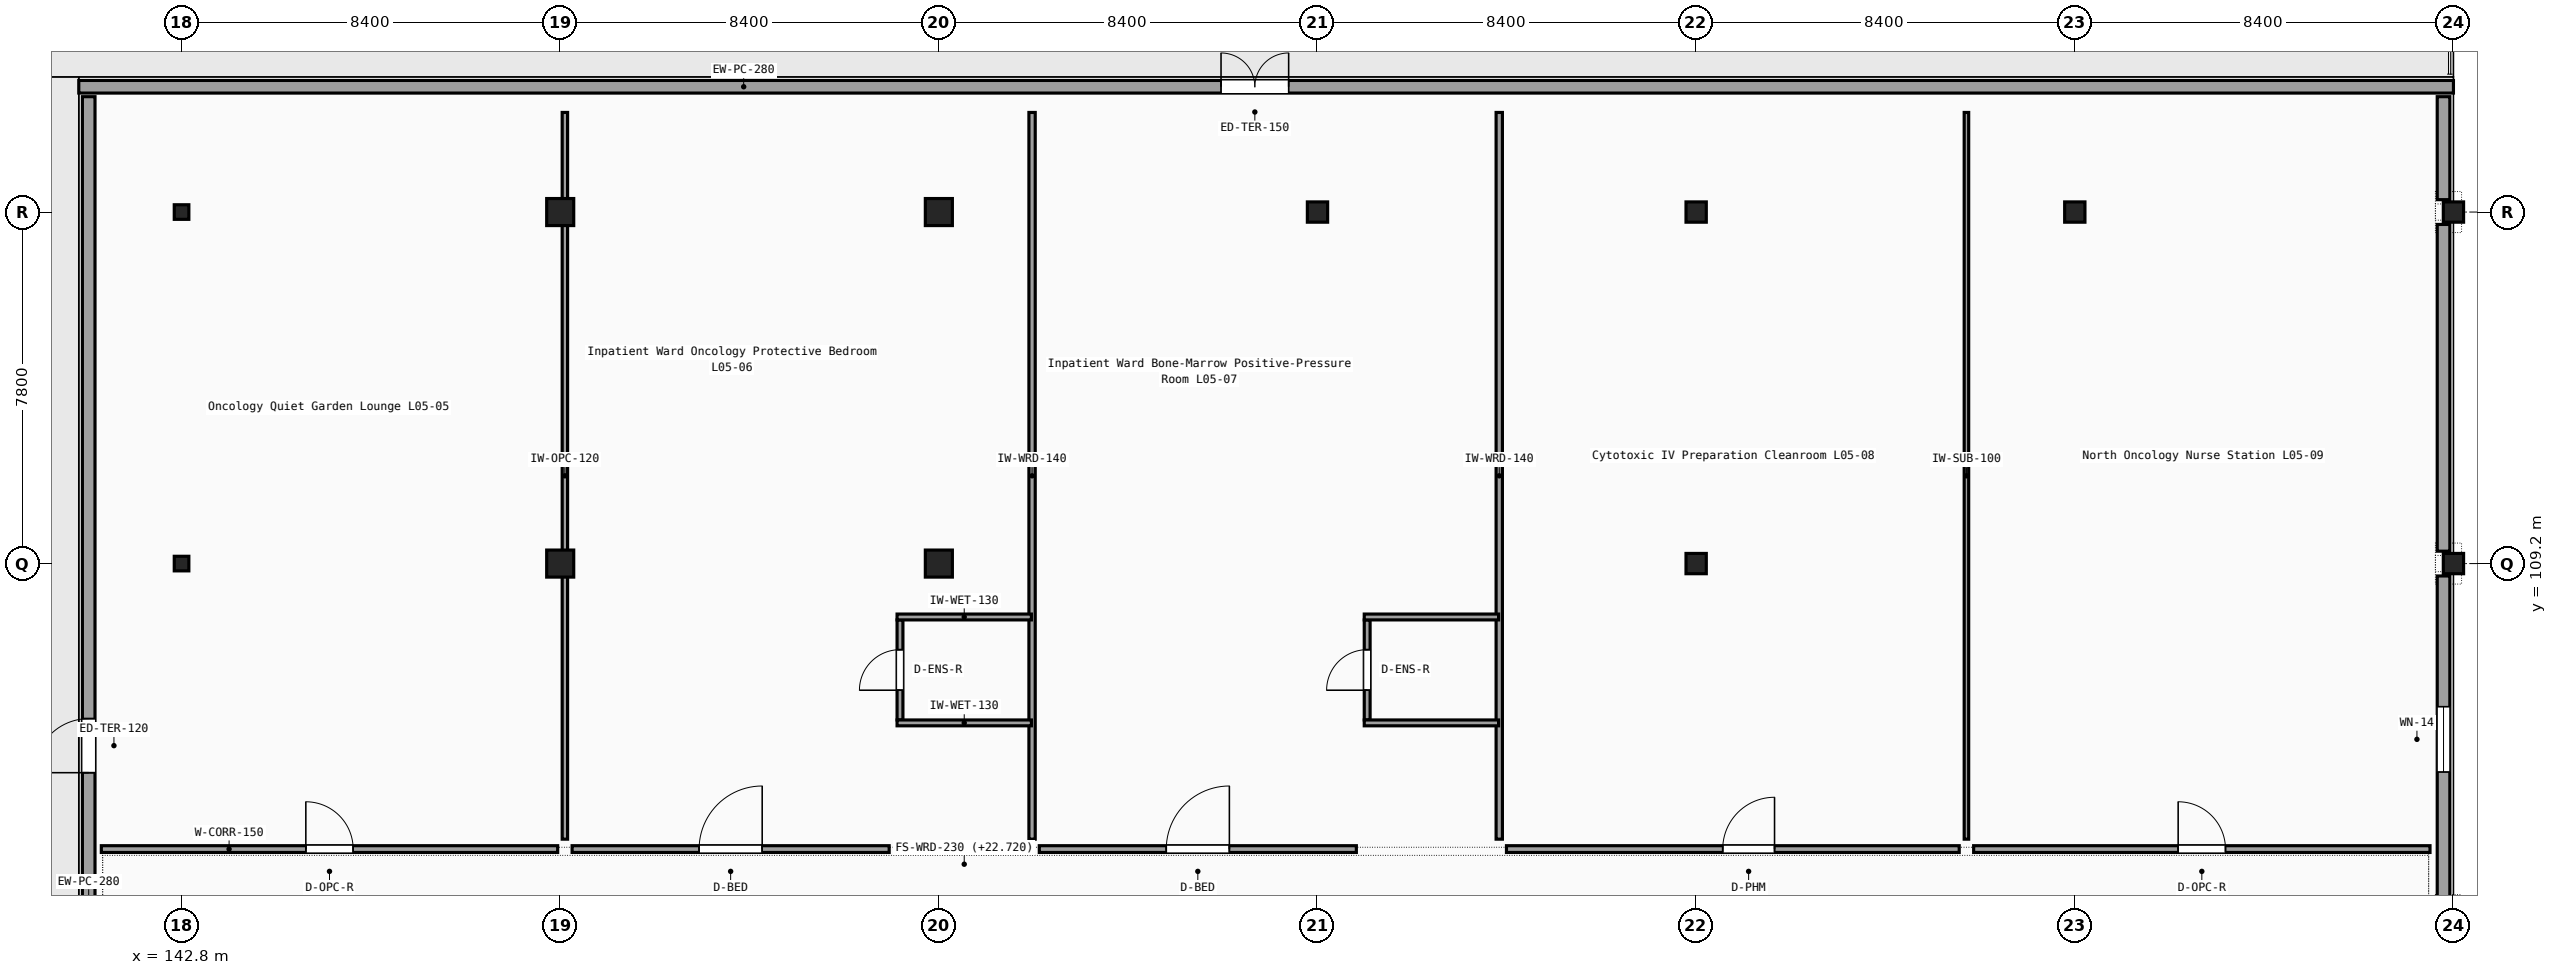
"""IFC4 building model, lengths in metres.
Left out: names, types, materials, properties, quantities, classifications, styles, units other than length and angle.
Written with IfcOpenShell. Run it as: python <this file> out.ifc"""

import sys

from ifc_helpers import new_model, si_unit, direction, frame, frame_2d, origin, origin_2d, place, context, subcontext, project, spatial, rectangle, hollow_circle, i_section, extrude, element, fill, save


model = new_model("IFC4")
c1 = context("Model", 3, precision=1e-05, world=origin(), true_north=direction((0.0, 1.0)))
c2 = subcontext(c1, "Body", "Model", "MODEL_VIEW")
j1 = project(units=[si_unit("LENGTHUNIT", "METRE"), si_unit("PLANEANGLEUNIT", "RADIAN")], contexts=[c1])
p1 = place(None, origin())
s1 = spatial("IfcSite", under=j1, at=p1, CompositionType="ELEMENT")
p2 = place(p1, origin())
s2 = spatial("IfcBuilding", under=s1, at=p2, CompositionType="ELEMENT")
p3 = place(p2, frame((0.0, 0.0, 22.95)))
s3 = spatial("IfcBuildingStorey", under=s2, at=p3, CompositionType="ELEMENT", Elevation=22.95)
for number, where, z_axis, x_axis in (
    (1, (142.8, 109.2, 0.0), (0.0, 0.0, 1.0), (1.0, 0.0, 0.0)),
    (2, (142.8, 117.0, 0.0), (0.0, 0.0, 1.0), (1.0, 0.0, 0.0)),
):
    element("IfcColumn", number, at=place(p3, frame(where, z_axis=z_axis, x_axis=x_axis)), inside=s3, PredefinedType="COLUMN", context=c2, shape_type="SweptSolid", body=[
        extrude(hollow_circle(Radius=0.162, WallThickness=0.016, at=origin_2d()), origin(), (0.0, 0.0, 1.0), 3.84),
    ])
for number, where, z_axis, x_axis in (
    (3, (151.2, 109.2, 0.0), (0.0, 0.0, 1.0), (1.0, 0.0, 0.0)),
    (4, (151.2, 117.0, 0.0), (0.0, 0.0, 1.0), (1.0, 0.0, 0.0)),
    (5, (159.6, 109.2, 0.0), (0.0, 0.0, 1.0), (1.0, 0.0, 0.0)),
    (6, (159.6, 117.0, 0.0), (0.0, 0.0, 1.0), (1.0, 0.0, 0.0)),
):
    element("IfcColumn", number, at=place(p3, frame(where, z_axis=z_axis, x_axis=x_axis)), inside=s3, PredefinedType="COLUMN", context=c2, shape_type="SweptSolid", body=[
        extrude(rectangle(XDim=0.6, YDim=0.6, at=origin_2d()), origin(), (0.0, 0.0, 1.0), 4.05),
    ])
for number, where, z_axis, x_axis in (
    (7, (168.0, 117.0, 0.0), (0.0, 0.0, 1.0), (1.0, 0.0, 0.0)),
    (8, (176.4, 109.2, 0.0), (0.0, 0.0, 1.0), (1.0, 0.0, 0.0)),
    (9, (176.4, 117.0, 0.0), (0.0, 0.0, 1.0), (1.0, 0.0, 0.0)),
    (10, (184.8, 117.0, 0.0), (0.0, 0.0, 1.0), (1.0, 0.0, 0.0)),
    (11, (193.2, 109.2, 0.0), (0.0, 0.0, 1.0), (1.0, 0.0, 0.0)),
    (12, (193.2, 117.0, 0.0), (0.0, 0.0, 1.0), (1.0, 0.0, 0.0)),
):
    element("IfcColumn", number, at=place(p3, frame(where, z_axis=z_axis, x_axis=x_axis)), inside=s3, PredefinedType="COLUMN", context=c2, shape_type="SweptSolid", body=[
        extrude(i_section(OverallWidth=0.3, OverallDepth=0.45, WebThickness=0.014, FlangeThickness=0.026, FilletRadius=0.027, at=origin_2d()), origin(), (0.0, 0.0, 1.0), 4.05),
    ])
p4 = place(p3, frame((140.74, 39.56, 0.0), z_axis=(0.0, 0.0, 1.0), x_axis=(0.0, 1.0, 0.0)))
e13 = element("IfcWall", 13, at=p4, inside=s3, PredefinedType="SOLIDWALL", context=c2, shape_type="SweptSolid", body=[
    extrude(rectangle(XDim=80.0, YDim=0.28, at=frame_2d((40.0, 0.0))), origin(), (0.0, 0.0, 1.0), 3.77),
])
p5 = place(p4, frame((22.15, 0.0, 0.0)))
e14 = element("IfcOpeningElement", 14, at=p5, cuts=e13, PredefinedType="OPENING", context=c2, shape_type="SweptSolid", body=[
    extrude(rectangle(XDim=1.5, YDim=2.2, at=frame_2d((0.75, 1.1))), frame((0.0, 0.15, 0.0), z_axis=(0.0, -1.0, 0.0), x_axis=(1.0, 0.0, 0.0)), (0.0, 0.0, 1.0), 0.3),
])
p6 = place(p4, frame((65.0, 0.0, 0.0)))
e15 = element("IfcOpeningElement", 15, at=p6, cuts=e13, PredefinedType="OPENING", context=c2, shape_type="SweptSolid", body=[
    extrude(rectangle(XDim=1.2, YDim=2.2, at=frame_2d((0.6, 1.1))), frame((0.0, 0.15, 0.0), z_axis=(0.0, -1.0, 0.0), x_axis=(1.0, 0.0, 0.0)), (0.0, 0.0, 1.0), 0.3),
])
p7 = place(p3, frame((140.52, 119.78, 0.0), z_axis=(0.0, 0.0, 1.0), x_axis=(1.0, 0.0, 0.0)))
e16 = element("IfcWall", 16, at=p7, inside=s3, PredefinedType="SOLIDWALL", context=c2, shape_type="SweptSolid", body=[
    extrude(rectangle(XDim=52.68, YDim=0.28, at=frame_2d((26.34, 0.0))), origin(), (0.0, 0.0, 1.0), 3.77),
])
p8 = place(p7, frame((25.34, 0.0, 0.0)))
e17 = element("IfcOpeningElement", 17, at=p8, cuts=e16, PredefinedType="OPENING", context=c2, shape_type="SweptSolid", body=[
    extrude(rectangle(XDim=1.5, YDim=2.2, at=frame_2d((0.75, 1.1))), frame((0.0, 0.15, 0.0), z_axis=(0.0, -1.0, 0.0), x_axis=(1.0, 0.0, 0.0)), (0.0, 0.0, 1.0), 0.3),
])
p9 = place(p3, frame((192.98, 101.675, 0.0), z_axis=(0.0, 0.0, 1.0), x_axis=(0.0, 1.0, 0.0)))
e18 = element("IfcWall", 18, at=p9, inside=s3, PredefinedType="SOLIDWALL", context=c2, shape_type="SweptSolid", body=[
    extrude(rectangle(XDim=7.25, YDim=0.28, at=frame_2d((3.625, 0.0))), origin(), (0.0, 0.0, 1.0), 3.25),
])
p10 = place(p9, frame((2.9, 0.0, 0.85)))
e19 = element("IfcOpeningElement", 19, at=p10, cuts=e18, PredefinedType="OPENING", context=c2, shape_type="SweptSolid", body=[
    extrude(rectangle(XDim=1.45, YDim=1.65, at=frame_2d((0.725, 0.825))), frame((0.0, 0.15, 0.0), z_axis=(0.0, -1.0, 0.0), x_axis=(1.0, 0.0, 0.0)), (0.0, 0.0, 1.0), 0.3),
])
p11 = place(p3, frame((192.98, 109.475, 0.0), z_axis=(0.0, 0.0, 1.0), x_axis=(0.0, 1.0, 0.0)))
e20 = element("IfcWall", 20, at=p11, inside=s3, PredefinedType="SOLIDWALL", context=c2, shape_type="SweptSolid", body=[
    extrude(rectangle(XDim=7.25, YDim=0.28, at=frame_2d((3.625, 0.0))), origin(), (0.0, 0.0, 1.0), 3.25),
])
p12 = place(p3, frame((192.98, 117.275, 0.0), z_axis=(0.0, 0.0, 1.0), x_axis=(0.0, 1.0, 0.0)))
e21 = element("IfcWall", 21, at=p12, inside=s3, PredefinedType="SOLIDWALL", context=c2, shape_type="SweptSolid", body=[
    extrude(rectangle(XDim=2.285, YDim=0.28, at=frame_2d((1.143, 0.0))), origin(), (0.0, 0.0, 1.0), 3.52),
])
p13 = place(p3, frame((141.02, 102.865, 0.0), z_axis=(0.0, 0.0, 1.0), x_axis=(1.0, 0.0, 0.0)))
e22 = element("IfcWall", 22, at=p13, inside=s3, PredefinedType="PARTITIONING", context=c2, shape_type="SweptSolid", body=[
    extrude(rectangle(XDim=10.124, YDim=0.15, at=frame_2d((5.062, 0.0))), origin(), (0.0, 0.0, 1.0), 3.51),
])
p14 = place(p13, frame((4.537, 0.0, 0.0)))
e23 = element("IfcOpeningElement", 23, at=p14, cuts=e22, PredefinedType="OPENING", context=c2, shape_type="SweptSolid", body=[
    extrude(rectangle(XDim=1.05, YDim=2.15, at=frame_2d((0.525, 1.075))), frame((0.0, 0.085, 0.0), z_axis=(0.0, -1.0, 0.0), x_axis=(1.0, 0.0, 0.0)), (0.0, 0.0, 1.0), 0.17),
])
p15 = place(p3, frame((151.304, 103.085, 0.0), z_axis=(0.0, 0.0, 1.0), x_axis=(0.0, 1.0, 0.0)))
e24 = element("IfcWall", 24, at=p15, inside=s3, PredefinedType="PARTITIONING", context=c2, shape_type="SweptSolid", body=[
    extrude(rectangle(XDim=16.125, YDim=0.12, at=frame_2d((8.062, 0.0))), origin(), (0.0, 0.0, 1.0), 3.25),
])
p16 = place(p3, frame((151.464, 102.865, 0.0), z_axis=(0.0, 0.0, 1.0), x_axis=(1.0, 0.0, 0.0)))
e25 = element("IfcWall", 25, at=p16, inside=s3, PredefinedType="PARTITIONING", context=c2, shape_type="SweptSolid", body=[
    extrude(rectangle(XDim=7.034, YDim=0.15, at=frame_2d((3.517, 0.0))), origin(), (0.0, 0.0, 1.0), 3.51),
])
p17 = place(p16, frame((2.817, 0.0, 0.0)))
e26 = element("IfcOpeningElement", 26, at=p17, cuts=e25, PredefinedType="OPENING", context=c2, shape_type="SweptSolid", body=[
    extrude(rectangle(XDim=1.4, YDim=2.2, at=frame_2d((0.7, 1.1))), frame((0.0, 0.085, 0.0), z_axis=(0.0, -1.0, 0.0), x_axis=(1.0, 0.0, 0.0)), (0.0, 0.0, 1.0), 0.17),
])
p18 = place(p3, frame((161.668, 103.085, 0.0), z_axis=(0.0, 0.0, 1.0), x_axis=(0.0, 1.0, 0.0)))
e27 = element("IfcWall", 27, at=p18, inside=s3, PredefinedType="PARTITIONING", context=c2, shape_type="SweptSolid", body=[
    extrude(rectangle(XDim=16.125, YDim=0.14, at=frame_2d((8.062, 0.0))), origin(), (0.0, 0.0, 1.0), 3.25),
])
p19 = place(p3, frame((158.738, 105.73, 0.0), z_axis=(0.0, 0.0, 1.0), x_axis=(0.0, 1.0, 0.0)))
e28 = element("IfcWall", 28, at=p19, inside=s3, PredefinedType="PARTITIONING", context=c2, shape_type="SweptSolid", body=[
    extrude(rectangle(XDim=2.22, YDim=0.13, at=frame_2d((1.11, 0.0))), origin(), (0.0, 0.0, 1.0), 3.77),
])
p20 = place(p19, frame((0.66, 0.0, 0.0)))
e29 = element("IfcOpeningElement", 29, at=p20, cuts=e28, PredefinedType="OPENING", context=c2, shape_type="SweptSolid", body=[
    extrude(rectangle(XDim=0.9, YDim=2.1, at=frame_2d((0.45, 1.05))), frame((0.0, 0.075, 0.0), z_axis=(0.0, -1.0, 0.0), x_axis=(1.0, 0.0, 0.0)), (0.0, 0.0, 1.0), 0.15),
])
for number, where, z_axis, x_axis in (
    (30, (158.673, 105.665, 0.0), (0.0, 0.0, 1.0), (1.0, 0.0, 0.0)),
    (31, (158.673, 108.015, 0.0), (0.0, 0.0, 1.0), (1.0, 0.0, 0.0)),
):
    element("IfcWall", number, at=place(p3, frame(where, z_axis=z_axis, x_axis=x_axis)), inside=s3, PredefinedType="PARTITIONING", context=c2, shape_type="SweptSolid", body=[
        extrude(rectangle(XDim=2.98, YDim=0.13, at=frame_2d((1.49, 0.0))), origin(), (0.0, 0.0, 1.0), 3.51),
    ])
p21 = place(p3, frame((161.828, 102.865, 0.0), z_axis=(0.0, 0.0, 1.0), x_axis=(1.0, 0.0, 0.0)))
e32 = element("IfcWall", 32, at=p21, inside=s3, PredefinedType="PARTITIONING", context=c2, shape_type="SweptSolid", body=[
    extrude(rectangle(XDim=7.034, YDim=0.15, at=frame_2d((3.517, 0.0))), origin(), (0.0, 0.0, 1.0), 3.77),
])
p22 = place(p21, frame((2.817, 0.0, 0.0)))
e33 = element("IfcOpeningElement", 33, at=p22, cuts=e32, PredefinedType="OPENING", context=c2, shape_type="SweptSolid", body=[
    extrude(rectangle(XDim=1.4, YDim=2.2, at=frame_2d((0.7, 1.1))), frame((0.0, 0.085, 0.0), z_axis=(0.0, -1.0, 0.0), x_axis=(1.0, 0.0, 0.0)), (0.0, 0.0, 1.0), 0.17),
])
p23 = place(p3, frame((172.032, 103.085, 0.0), z_axis=(0.0, 0.0, 1.0), x_axis=(0.0, 1.0, 0.0)))
e34 = element("IfcWall", 34, at=p23, inside=s3, PredefinedType="PARTITIONING", context=c2, shape_type="SweptSolid", body=[
    extrude(rectangle(XDim=16.125, YDim=0.14, at=frame_2d((8.062, 0.0))), origin(), (0.0, 0.0, 1.0), 3.25),
])
p24 = place(p3, frame((169.102, 105.73, 0.0), z_axis=(0.0, 0.0, 1.0), x_axis=(0.0, 1.0, 0.0)))
e35 = element("IfcWall", 35, at=p24, inside=s3, PredefinedType="PARTITIONING", context=c2, shape_type="SweptSolid", body=[
    extrude(rectangle(XDim=2.22, YDim=0.13, at=frame_2d((1.11, 0.0))), origin(), (0.0, 0.0, 1.0), 3.77),
])
p25 = place(p24, frame((0.66, 0.0, 0.0)))
e36 = element("IfcOpeningElement", 36, at=p25, cuts=e35, PredefinedType="OPENING", context=c2, shape_type="SweptSolid", body=[
    extrude(rectangle(XDim=0.9, YDim=2.1, at=frame_2d((0.45, 1.05))), frame((0.0, 0.075, 0.0), z_axis=(0.0, -1.0, 0.0), x_axis=(1.0, 0.0, 0.0)), (0.0, 0.0, 1.0), 0.15),
])
for number, where, z_axis, x_axis in (
    (37, (169.037, 105.665, 0.0), (0.0, 0.0, 1.0), (1.0, 0.0, 0.0)),
    (38, (169.037, 108.015, 0.0), (0.0, 0.0, 1.0), (1.0, 0.0, 0.0)),
):
    element("IfcWall", number, at=place(p3, frame(where, z_axis=z_axis, x_axis=x_axis)), inside=s3, PredefinedType="PARTITIONING", context=c2, shape_type="SweptSolid", body=[
        extrude(rectangle(XDim=2.98, YDim=0.13, at=frame_2d((1.49, 0.0))), origin(), (0.0, 0.0, 1.0), 3.77),
    ])
p26 = place(p3, frame((172.192, 102.865, 0.0), z_axis=(0.0, 0.0, 1.0), x_axis=(1.0, 0.0, 0.0)))
e39 = element("IfcWall", 39, at=p26, inside=s3, PredefinedType="PARTITIONING", context=c2, shape_type="SweptSolid", body=[
    extrude(rectangle(XDim=10.044, YDim=0.15, at=frame_2d((5.022, 0.0))), origin(), (0.0, 0.0, 1.0), 3.51),
])
p27 = place(p26, frame((4.797, 0.0, 0.0)))
e40 = element("IfcOpeningElement", 40, at=p27, cuts=e39, PredefinedType="OPENING", context=c2, shape_type="SweptSolid", body=[
    extrude(rectangle(XDim=1.15, YDim=2.15, at=frame_2d((0.575, 1.075))), frame((0.0, 0.085, 0.0), z_axis=(0.0, -1.0, 0.0), x_axis=(1.0, 0.0, 0.0)), (0.0, 0.0, 1.0), 0.17),
])
p28 = place(p3, frame((182.396, 103.085, 0.0), z_axis=(0.0, 0.0, 1.0), x_axis=(0.0, 1.0, 0.0)))
e41 = element("IfcWall", 41, at=p28, inside=s3, PredefinedType="PARTITIONING", context=c2, shape_type="SweptSolid", body=[
    extrude(rectangle(XDim=16.125, YDim=0.1, at=frame_2d((8.062, 0.0))), origin(), (0.0, 0.0, 1.0), 3.25),
])
p29 = place(p3, frame((182.556, 102.865, 0.0), z_axis=(0.0, 0.0, 1.0), x_axis=(1.0, 0.0, 0.0)))
e42 = element("IfcWall", 42, at=p29, inside=s3, PredefinedType="PARTITIONING", context=c2, shape_type="SweptSolid", body=[
    extrude(rectangle(XDim=10.124, YDim=0.15, at=frame_2d((5.062, 0.0))), origin(), (0.0, 0.0, 1.0), 3.77),
])
p30 = place(p29, frame((4.537, 0.0, 0.0)))
e43 = element("IfcOpeningElement", 43, at=p30, cuts=e42, PredefinedType="OPENING", context=c2, shape_type="SweptSolid", body=[
    extrude(rectangle(XDim=1.05, YDim=2.15, at=frame_2d((0.525, 1.075))), frame((0.0, 0.085, 0.0), z_axis=(0.0, -1.0, 0.0), x_axis=(1.0, 0.0, 0.0)), (0.0, 0.0, 1.0), 0.17),
])
p31 = place(p6, origin())
e44 = element("IfcDoor", 44, at=p31, inside=s3, OperationType="SINGLE_SWING_LEFT", PredefinedType="DOOR", context=c2, shape_type="SweptSolid", body=[
    extrude(rectangle(XDim=1.2, YDim=2.2, at=frame_2d((0.6, 1.1))), frame((0.0, 0.025, 0.0), z_axis=(0.0, -1.0, 0.0), x_axis=(1.0, 0.0, 0.0)), (0.0, 0.0, 1.0), 0.05),
])
fill(e15, e44)
p32 = place(p8, origin())
e45 = element("IfcDoor", 45, at=p32, inside=s3, OperationType="DOUBLE_DOOR_SINGLE_SWING", PredefinedType="DOOR", context=c2, shape_type="SweptSolid", body=[
    extrude(rectangle(XDim=1.5, YDim=2.2, at=frame_2d((0.75, 1.1))), frame((0.0, 0.025, 0.0), z_axis=(0.0, -1.0, 0.0), x_axis=(1.0, 0.0, 0.0)), (0.0, 0.0, 1.0), 0.05),
])
fill(e17, e45)
p33 = place(p10, origin())
e46 = element("IfcWindow", 46, at=p33, inside=s3, PartitioningType="SINGLE_PANEL", PredefinedType="WINDOW", context=c2, shape_type="SweptSolid", body=[
    extrude(rectangle(XDim=1.45, YDim=1.65, at=frame_2d((0.725, 0.825))), frame((0.0, 0.03, 0.0), z_axis=(0.0, -1.0, 0.0), x_axis=(1.0, 0.0, 0.0)), (0.0, 0.0, 1.0), 0.06),
])
fill(e19, e46)
p34 = place(p14, origin())
e47 = element("IfcDoor", 47, at=p34, inside=s3, OperationType="SINGLE_SWING_LEFT", PredefinedType="DOOR", context=c2, shape_type="SweptSolid", body=[
    extrude(rectangle(XDim=1.05, YDim=2.15, at=frame_2d((0.525, 1.075))), frame((0.0, 0.025, 0.0), z_axis=(0.0, -1.0, 0.0), x_axis=(1.0, 0.0, 0.0)), (0.0, 0.0, 1.0), 0.05),
])
fill(e23, e47)
p35 = place(p17, origin())
e48 = element("IfcDoor", 48, at=p35, inside=s3, OperationType="SINGLE_SWING_RIGHT", PredefinedType="DOOR", context=c2, shape_type="SweptSolid", body=[
    extrude(rectangle(XDim=1.4, YDim=2.2, at=frame_2d((0.7, 1.1))), frame((0.0, 0.025, 0.0), z_axis=(0.0, -1.0, 0.0), x_axis=(1.0, 0.0, 0.0)), (0.0, 0.0, 1.0), 0.05),
])
fill(e26, e48)
p36 = place(p20, origin())
e49 = element("IfcDoor", 49, at=p36, inside=s3, OperationType="SINGLE_SWING_LEFT", PredefinedType="DOOR", context=c2, shape_type="SweptSolid", body=[
    extrude(rectangle(XDim=0.9, YDim=2.1, at=frame_2d((0.45, 1.05))), frame((0.0, 0.025, 0.0), z_axis=(0.0, -1.0, 0.0), x_axis=(1.0, 0.0, 0.0)), (0.0, 0.0, 1.0), 0.05),
])
fill(e29, e49)
p37 = place(p22, origin())
e50 = element("IfcDoor", 50, at=p37, inside=s3, OperationType="SINGLE_SWING_RIGHT", PredefinedType="DOOR", context=c2, shape_type="SweptSolid", body=[
    extrude(rectangle(XDim=1.4, YDim=2.2, at=frame_2d((0.7, 1.1))), frame((0.0, 0.025, 0.0), z_axis=(0.0, -1.0, 0.0), x_axis=(1.0, 0.0, 0.0)), (0.0, 0.0, 1.0), 0.05),
])
fill(e33, e50)
p38 = place(p25, origin())
e51 = element("IfcDoor", 51, at=p38, inside=s3, OperationType="SINGLE_SWING_LEFT", PredefinedType="DOOR", context=c2, shape_type="SweptSolid", body=[
    extrude(rectangle(XDim=0.9, YDim=2.1, at=frame_2d((0.45, 1.05))), frame((0.0, 0.025, 0.0), z_axis=(0.0, -1.0, 0.0), x_axis=(1.0, 0.0, 0.0)), (0.0, 0.0, 1.0), 0.05),
])
fill(e36, e51)
p39 = place(p27, origin())
e52 = element("IfcDoor", 52, at=p39, inside=s3, OperationType="SINGLE_SWING_RIGHT", PredefinedType="DOOR", context=c2, shape_type="SweptSolid", body=[
    extrude(rectangle(XDim=1.15, YDim=2.15, at=frame_2d((0.575, 1.075))), frame((0.0, 0.025, 0.0), z_axis=(0.0, -1.0, 0.0), x_axis=(1.0, 0.0, 0.0)), (0.0, 0.0, 1.0), 0.05),
])
fill(e40, e52)
p40 = place(p30, origin())
e53 = element("IfcDoor", 53, at=p40, inside=s3, OperationType="SINGLE_SWING_LEFT", PredefinedType="DOOR", context=c2, shape_type="SweptSolid", body=[
    extrude(rectangle(XDim=1.05, YDim=2.15, at=frame_2d((0.525, 1.075))), frame((0.0, 0.025, 0.0), z_axis=(0.0, -1.0, 0.0), x_axis=(1.0, 0.0, 0.0)), (0.0, 0.0, 1.0), 0.05),
])
fill(e43, e53)
save(model, sys.argv[1])
